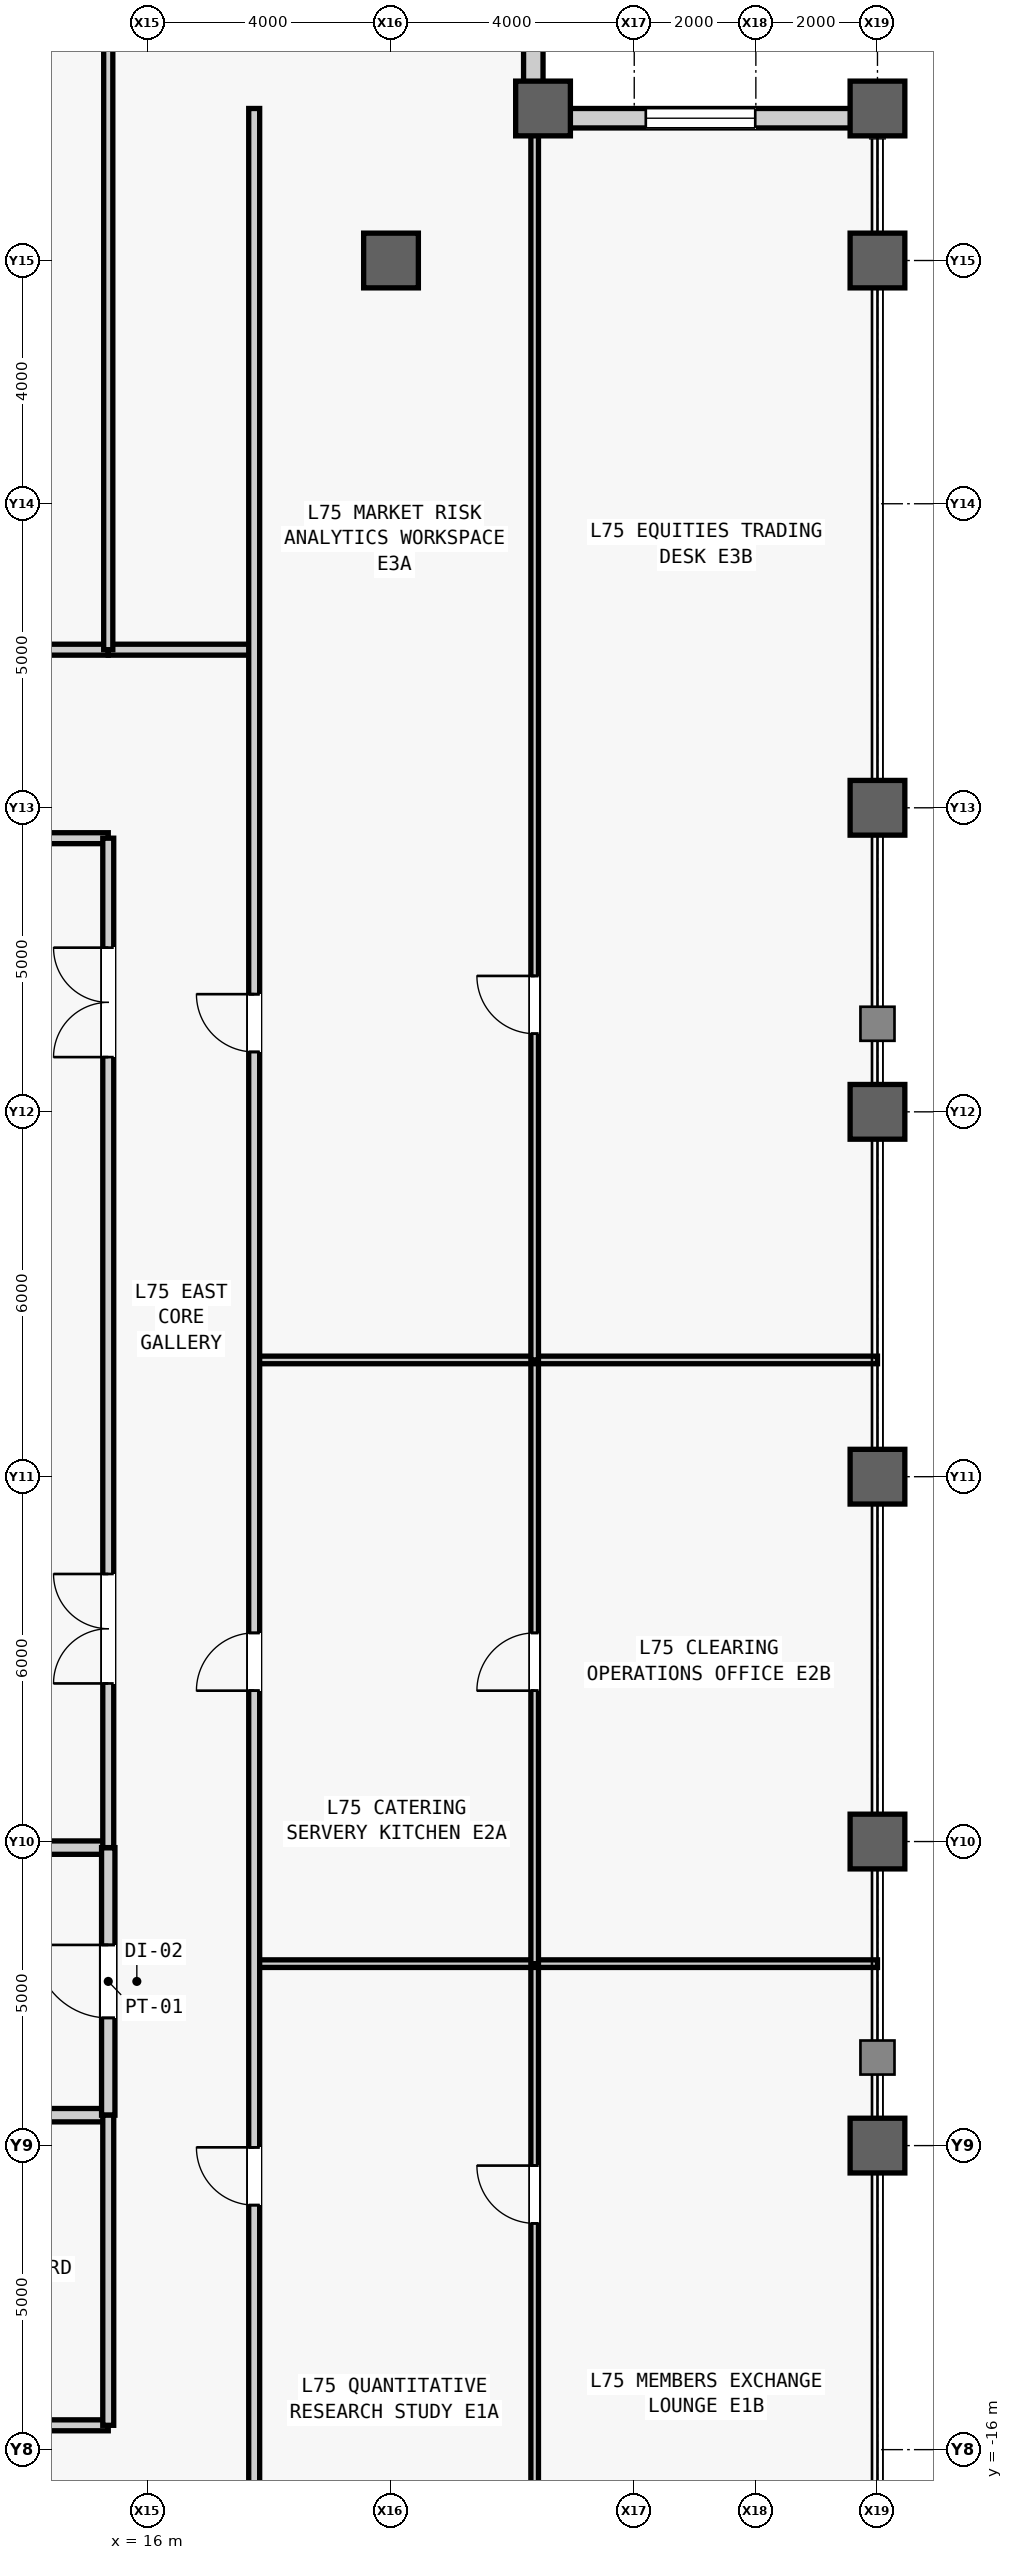
"""IFC4 building model, lengths in metres.
Left out: names, types, materials, properties, quantities, classifications, styles, units other than length and angle.
Written with IfcOpenShell. Run it as: python <this file> out.ifc"""

import sys

from ifc_helpers import new_model, si_unit, direction, frame, frame_2d, origin, origin_2d, place, context, subcontext, project, spatial, rectangle, hollow_rectangle, extrude, source, transform, mapped, element, fill, save


model = new_model("IFC4")
c1 = context("Model", 3, precision=1e-05, world=origin(), true_north=direction((0.0, 1.0)))
c2 = subcontext(c1, "Body", "Model", "MODEL_VIEW")
j1 = project(units=[si_unit("LENGTHUNIT", "METRE"), si_unit("PLANEANGLEUNIT", "RADIAN")], contexts=[c1])
p1 = place(None, origin())
s1 = spatial("IfcSite", under=j1, at=p1, CompositionType="ELEMENT")
p2 = place(p1, origin())
s2 = spatial("IfcBuilding", under=s1, at=p2, CompositionType="ELEMENT")
p3 = place(p2, frame((0.0, 0.0, 317.5)))
s3 = spatial("IfcBuildingStorey", under=s2, at=p3, CompositionType="ELEMENT", Elevation=317.5)
m1 = source(origin(), c2, "Body", "SweptSolid", [
    extrude(hollow_rectangle(XDim=0.9, YDim=0.9, WallThickness=0.05, at=origin_2d()), origin(), (0.0, 0.0, 1.0), 4.0),
])
for number, where, z_axis, x_axis in (
    (1, (20.0, 20.0, 0.0), (0.0, 0.0, 1.0), (1.0, 0.0, 0.0)),
    (2, (22.5, 22.5, 0.0), (0.0, 0.0, 1.0), (1.0, 0.0, 0.0)),
    (3, (28.0, -11.0, 0.0), (0.0, 0.0, 1.0), (1.0, 0.0, 0.0)),
    (4, (28.0, -6.0, 0.0), (0.0, 0.0, 1.0), (1.0, 0.0, 0.0)),
    (5, (28.0, 0.0, 0.0), (0.0, 0.0, 1.0), (1.0, 0.0, 0.0)),
    (6, (28.0, 6.0, 0.0), (0.0, 0.0, 1.0), (1.0, 0.0, 0.0)),
    (7, (28.0, 11.0, 0.0), (0.0, 0.0, 1.0), (1.0, 0.0, 0.0)),
    (8, (28.0, 20.0, 0.0), (0.0, 0.0, 1.0), (1.0, 0.0, 0.0)),
    (9, (28.0, 22.5, 0.0), (0.0, 0.0, 1.0), (1.0, 0.0, 0.0)),
):
    element("IfcColumn", number, at=place(p3, frame(where, z_axis=z_axis, x_axis=x_axis)), inside=s3, PredefinedType="COLUMN", context=c2, shape_type="MappedRepresentation", body=[
        mapped(m1, transform((0.0, 0.0, 0.0), scale=1.0)),
    ])
m2 = source(origin(), c2, "Body", "SweptSolid", [
    extrude(rectangle(XDim=5.18, YDim=0.32, at=frame_2d((2.59, 0.0))), origin(), (0.0, 0.0, 1.0), 3.231),
])
p4 = place(p3, frame((22.5, 22.34, 0.0), z_axis=(0.0, 0.0, 1.0), x_axis=(1.0, 0.0, 0.0)))
e10 = element("IfcWall", 10, at=p4, inside=s3, PredefinedType="STANDARD", context=c2, shape_type="MappedRepresentation", body=[
    mapped(m2, transform((0.0, 0.0, 0.0), scale=1.0)),
])
m3 = source(origin(), c2, "Body", "SweptSolid", [
    extrude(rectangle(XDim=1.8, YDim=2.4, at=frame_2d((0.9, 1.2))), frame((0.0, 0.17, 0.0), z_axis=(0.0, -1.0, 0.0), x_axis=(1.0, 0.0, 0.0)), (0.0, 0.0, 1.0), 0.34),
])
p5 = place(p4, frame((1.69, 0.0, 0.5)))
e11 = element("IfcOpeningElement", 11, at=p5, cuts=e10, PredefinedType="OPENING", context=c2, shape_type="MappedRepresentation", body=[
    mapped(m3, transform((0.0, 0.0, 0.0), scale=1.0)),
])
p6 = place(p3, frame((22.34, 22.5, 0.0), z_axis=(0.0, 0.0, 1.0), x_axis=(0.0, 1.0, 0.0)))
e12 = element("IfcWall", 12, at=p6, inside=s3, PredefinedType="STANDARD", context=c2, shape_type="MappedRepresentation", body=[
    mapped(m2, transform((0.0, 0.0, 0.0), scale=1.0)),
])
p7 = place(p6, frame((1.69, 0.0, 0.5)))
e13 = element("IfcOpeningElement", 13, at=p7, cuts=e12, PredefinedType="OPENING", context=c2, shape_type="MappedRepresentation", body=[
    mapped(m3, transform((0.0, 0.0, 0.0), scale=1.0)),
])
m4 = source(origin(), c2, "Body", "SweptSolid", [
    extrude(rectangle(XDim=4.05, YDim=0.22, at=frame_2d((2.025, 0.0))), origin(), (0.0, 0.0, 1.0), 3.78),
])
p8 = place(p3, frame((11.3, -10.5, 0.0), z_axis=(0.0, 0.0, 1.0), x_axis=(1.0, 0.0, 0.0)))
e14 = element("IfcWall", 14, at=p8, inside=s3, PredefinedType="PARTITIONING", context=c2, shape_type="MappedRepresentation", body=[
    mapped(m4, transform((0.0, 0.0, 0.0), scale=1.0)),
])
m5 = source(origin(), c2, "Body", "SweptSolid", [
    extrude(rectangle(XDim=4.05, YDim=0.22, at=frame_2d((2.025, 0.0))), origin(), (0.0, 0.0, 1.0), 3.085),
])
p9 = place(p3, frame((11.3, -6.1, 0.0), z_axis=(0.0, 0.0, 1.0), x_axis=(1.0, 0.0, 0.0)))
e15 = element("IfcWall", 15, at=p9, inside=s3, PredefinedType="PARTITIONING", context=c2, shape_type="MappedRepresentation", body=[
    mapped(m5, transform((0.0, 0.0, 0.0), scale=1.0)),
])
m6 = source(origin(), c2, "Body", "SweptSolid", [
    extrude(rectangle(XDim=4.4, YDim=0.22, at=frame_2d((2.2, 0.0))), origin(), (0.0, 0.0, 1.0), 3.78),
])
p10 = place(p3, frame((15.35, -10.5, 0.0), z_axis=(0.0, 0.0, 1.0), x_axis=(0.0, 1.0, 0.0)))
e16 = element("IfcWall", 16, at=p10, inside=s3, PredefinedType="PARTITIONING", context=c2, shape_type="MappedRepresentation", body=[
    mapped(m6, transform((0.0, 0.0, 0.0), scale=1.0)),
])
m7 = source(origin(), c2, "Body", "SweptSolid", [
    extrude(rectangle(XDim=1.2, YDim=2.2, at=frame_2d((0.6, 1.1))), frame((0.0, 0.12, 0.0), z_axis=(0.0, -1.0, 0.0), x_axis=(1.0, 0.0, 0.0)), (0.0, 0.0, 1.0), 0.24),
])
p11 = place(p10, frame((1.6, 0.0, 0.0)))
e17 = element("IfcOpeningElement", 17, at=p11, cuts=e16, PredefinedType="OPENING", context=c2, shape_type="MappedRepresentation", body=[
    mapped(m7, transform((0.0, 0.0, 0.0), scale=1.0)),
])
m8 = source(origin(), c2, "Body", "SweptSolid", [
    extrude(rectangle(XDim=4.05, YDim=0.18, at=frame_2d((2.025, 0.0))), origin(), (0.0, 0.0, 1.0), 3.78),
])
p12 = place(p3, frame((11.3, 10.5, 0.0), z_axis=(0.0, 0.0, 1.0), x_axis=(1.0, 0.0, 0.0)))
e18 = element("IfcWall", 18, at=p12, inside=s3, PredefinedType="PARTITIONING", context=c2, shape_type="MappedRepresentation", body=[
    mapped(m8, transform((0.0, 0.0, 0.0), scale=1.0)),
])
m9 = source(origin(), c2, "Body", "SweptSolid", [
    extrude(rectangle(XDim=16.6, YDim=0.18, at=frame_2d((8.3, 0.0))), origin(), (0.0, 0.0, 1.0), 3.78),
])
p13 = place(p3, frame((15.35, -6.1, 0.0), z_axis=(0.0, 0.0, 1.0), x_axis=(0.0, 1.0, 0.0)))
e19 = element("IfcWall", 19, at=p13, inside=s3, PredefinedType="PARTITIONING", context=c2, shape_type="MappedRepresentation", body=[
    mapped(m9, transform((0.0, 0.0, 0.0), scale=1.0)),
])
m10 = source(origin(), c2, "Body", "SweptSolid", [
    extrude(rectangle(XDim=1.8, YDim=2.25, at=frame_2d((0.9, 1.125))), frame((0.0, 0.1, 0.0), z_axis=(0.0, -1.0, 0.0), x_axis=(1.0, 0.0, 0.0)), (0.0, 0.0, 1.0), 0.2),
])
p14 = place(p13, frame((2.7, 0.0, 0.0)))
e20 = element("IfcOpeningElement", 20, at=p14, cuts=e19, PredefinedType="OPENING", context=c2, shape_type="MappedRepresentation", body=[
    mapped(m10, transform((0.0, 0.0, 0.0), scale=1.0)),
])
p15 = place(p13, frame((13.0, 0.0, 0.0)))
e21 = element("IfcOpeningElement", 21, at=p15, cuts=e19, PredefinedType="OPENING", context=c2, shape_type="MappedRepresentation", body=[
    mapped(m10, transform((0.0, 0.0, 0.0), scale=1.0)),
])
m11 = source(origin(), c2, "Body", "SweptSolid", [
    extrude(rectangle(XDim=14.05, YDim=0.18, at=frame_2d((7.025, 0.0))), origin(), (0.0, 0.0, 1.0), 3.78),
])
p16 = place(p3, frame((1.3, -15.6, 0.0), z_axis=(0.0, 0.0, 1.0), x_axis=(1.0, 0.0, 0.0)))
e22 = element("IfcWall", 22, at=p16, inside=s3, PredefinedType="PARTITIONING", context=c2, shape_type="MappedRepresentation", body=[
    mapped(m11, transform((0.0, 0.0, 0.0), scale=1.0)),
])
m12 = source(origin(), c2, "Body", "SweptSolid", [
    extrude(rectangle(XDim=0.9, YDim=2.15, at=frame_2d((0.45, 1.075))), frame((0.0, 0.1, 0.0), z_axis=(0.0, -1.0, 0.0), x_axis=(1.0, 0.0, 0.0)), (0.0, 0.0, 1.0), 0.2),
])
p17 = place(p16, frame((6.25, 0.0, 0.0)))
e23 = element("IfcOpeningElement", 23, at=p17, cuts=e22, PredefinedType="OPENING", context=c2, shape_type="MappedRepresentation", body=[
    mapped(m12, transform((0.0, 0.0, 0.0), scale=1.0)),
])
m13 = source(origin(), c2, "Body", "SweptSolid", [
    extrude(rectangle(XDim=5.1, YDim=0.18, at=frame_2d((2.55, 0.0))), origin(), (0.0, 0.0, 1.0), 3.78),
])
p18 = place(p3, frame((15.35, -15.6, 0.0), z_axis=(0.0, 0.0, 1.0), x_axis=(0.0, 1.0, 0.0)))
e24 = element("IfcWall", 24, at=p18, inside=s3, PredefinedType="PARTITIONING", context=c2, shape_type="MappedRepresentation", body=[
    mapped(m13, transform((0.0, 0.0, 0.0), scale=1.0)),
])
m14 = source(origin(), c2, "Body", "SweptSolid", [
    extrude(rectangle(XDim=2.4, YDim=0.18, at=frame_2d((1.2, 0.0))), origin(), (0.0, 0.0, 1.0), 3.78),
])
p19 = place(p3, frame((15.35, 13.6, 0.0), z_axis=(0.0, 0.0, 1.0), x_axis=(1.0, 0.0, 0.0)))
e25 = element("IfcWall", 25, at=p19, inside=s3, PredefinedType="PARTITIONING", context=c2, shape_type="MappedRepresentation", body=[
    mapped(m14, transform((0.0, 0.0, 0.0), scale=1.0)),
])
m15 = source(origin(), c2, "Body", "SweptSolid", [
    extrude(rectangle(XDim=32.75, YDim=0.18, at=frame_2d((16.375, 0.0))), origin(), (0.0, 0.0, 1.0), 3.78),
])
p20 = place(p3, frame((-17.4, 13.6, 0.0), z_axis=(0.0, 0.0, 1.0), x_axis=(1.0, 0.0, 0.0)))
e26 = element("IfcWall", 26, at=p20, inside=s3, PredefinedType="PARTITIONING", context=c2, shape_type="MappedRepresentation", body=[
    mapped(m15, transform((0.0, 0.0, 0.0), scale=1.0)),
])
m16 = source(origin(), c2, "Body", "SweptSolid", [
    extrude(rectangle(XDim=1.05, YDim=2.2, at=frame_2d((0.525, 1.1))), frame((0.0, 0.1, 0.0), z_axis=(0.0, -1.0, 0.0), x_axis=(1.0, 0.0, 0.0)), (0.0, 0.0, 1.0), 0.2),
])
p21 = place(p20, frame((27.075, 0.0, 0.0)))
e27 = element("IfcOpeningElement", 27, at=p21, cuts=e26, PredefinedType="OPENING", context=c2, shape_type="MappedRepresentation", body=[
    mapped(m16, transform((0.0, 0.0, 0.0), scale=1.0)),
])
m17 = source(origin(), c2, "Body", "SweptSolid", [
    extrude(rectangle(XDim=14.4, YDim=0.15, at=frame_2d((7.2, 0.0))), origin(), (0.0, 0.0, 1.0), 3.78),
])
p22 = place(p3, frame((15.35, 13.6, 0.0), z_axis=(0.0, 0.0, 1.0), x_axis=(0.0, 1.0, 0.0)))
e28 = element("IfcWall", 28, at=p22, inside=s3, PredefinedType="PARTITIONING", context=c2, shape_type="MappedRepresentation", body=[
    mapped(m17, transform((0.0, 0.0, 0.0), scale=1.0)),
])
m18 = source(origin(), c2, "Body", "SweptSolid", [
    extrude(rectangle(XDim=9.992, YDim=0.125, at=frame_2d((4.996, 0.0))), origin(), (0.0, 0.0, 1.0), 3.164),
])
p23 = place(p3, frame((22.363, -18.0, 0.0), z_axis=(0.0, 0.0, 1.0), x_axis=(0.0, 1.0, 0.0)))
e29 = element("IfcWall", 29, at=p23, inside=s3, PredefinedType="PARTITIONING", context=c2, shape_type="MappedRepresentation", body=[
    mapped(m18, transform((0.0, 0.0, 0.0), scale=1.0)),
])
m19 = source(origin(), c2, "Body", "SweptSolid", [
    extrude(rectangle(XDim=0.95, YDim=2.15, at=frame_2d((0.475, 1.075))), frame((0.0, 0.073, 0.0), z_axis=(0.0, -1.0, 0.0), x_axis=(1.0, 0.0, 0.0)), (0.0, 0.0, 1.0), 0.145),
])
p24 = place(p23, frame((5.721, 0.0, 0.0)))
e30 = element("IfcOpeningElement", 30, at=p24, cuts=e29, PredefinedType="OPENING", context=c2, shape_type="MappedRepresentation", body=[
    mapped(m19, transform((0.0, 0.0, 0.0), scale=1.0)),
])
m20 = source(origin(), c2, "Body", "SweptSolid", [
    extrude(rectangle(XDim=10.25, YDim=0.125, at=frame_2d((5.125, 0.0))), origin(), (0.0, 0.0, 1.0), 3.78),
])
p25 = place(p3, frame((17.75, -8.008, 0.0), z_axis=(0.0, 0.0, 1.0), x_axis=(1.0, 0.0, 0.0)))
e31 = element("IfcWall", 31, at=p25, inside=s3, PredefinedType="PARTITIONING", context=c2, shape_type="MappedRepresentation", body=[
    mapped(m20, transform((0.0, 0.0, 0.0), scale=1.0)),
])
m21 = source(origin(), c2, "Body", "SweptSolid", [
    extrude(rectangle(XDim=9.928, YDim=0.125, at=frame_2d((4.964, 0.0))), origin(), (0.0, 0.0, 1.0), 3.78),
])
p26 = place(p3, frame((22.363, -8.008, 0.0), z_axis=(0.0, 0.0, 1.0), x_axis=(0.0, 1.0, 0.0)))
e32 = element("IfcWall", 32, at=p26, inside=s3, PredefinedType="PARTITIONING", context=c2, shape_type="MappedRepresentation", body=[
    mapped(m21, transform((0.0, 0.0, 0.0), scale=1.0)),
])
p27 = place(p26, frame((4.489, 0.0, 0.0)))
e33 = element("IfcOpeningElement", 33, at=p27, cuts=e32, PredefinedType="OPENING", context=c2, shape_type="MappedRepresentation", body=[
    mapped(m19, transform((0.0, 0.0, 0.0), scale=1.0)),
])
p28 = place(p3, frame((17.75, 1.92, 0.0), z_axis=(0.0, 0.0, 1.0), x_axis=(1.0, 0.0, 0.0)))
e34 = element("IfcWall", 34, at=p28, inside=s3, PredefinedType="PARTITIONING", context=c2, shape_type="MappedRepresentation", body=[
    mapped(m20, transform((0.0, 0.0, 0.0), scale=1.0)),
])
m22 = source(origin(), c2, "Body", "SweptSolid", [
    extrude(rectangle(XDim=20.58, YDim=0.125, at=frame_2d((10.29, 0.0))), origin(), (0.0, 0.0, 1.0), 3.164),
])
p29 = place(p3, frame((22.363, 1.92, 0.0), z_axis=(0.0, 0.0, 1.0), x_axis=(0.0, 1.0, 0.0)))
e35 = element("IfcWall", 35, at=p29, inside=s3, PredefinedType="PARTITIONING", context=c2, shape_type="MappedRepresentation", body=[
    mapped(m22, transform((0.0, 0.0, 0.0), scale=1.0)),
])
p30 = place(p29, frame((5.365, 0.0, 0.0)))
e36 = element("IfcOpeningElement", 36, at=p30, cuts=e35, PredefinedType="OPENING", context=c2, shape_type="MappedRepresentation", body=[
    mapped(m19, transform((0.0, 0.0, 0.0), scale=1.0)),
])
m23 = source(origin(), c2, "Body", "SweptSolid", [
    extrude(rectangle(XDim=40.5, YDim=0.18, at=frame_2d((20.25, 0.0))), origin(), (0.0, 0.0, 1.0), 3.78),
])
p31 = place(p3, frame((17.75, -18.0, 0.0), z_axis=(0.0, 0.0, 1.0), x_axis=(0.0, 1.0, 0.0)))
e37 = element("IfcWall", 37, at=p31, inside=s3, PredefinedType="PARTITIONING", context=c2, shape_type="MappedRepresentation", body=[
    mapped(m23, transform((0.0, 0.0, 0.0), scale=1.0)),
])
m24 = source(origin(), c2, "Body", "SweptSolid", [
    extrude(rectangle(XDim=0.95, YDim=2.15, at=frame_2d((0.475, 1.075))), frame((0.0, 0.1, 0.0), z_axis=(0.0, -1.0, 0.0), x_axis=(1.0, 0.0, 0.0)), (0.0, 0.0, 1.0), 0.2),
])
p32 = place(p31, frame((6.021, 0.0, 0.0)))
e38 = element("IfcOpeningElement", 38, at=p32, cuts=e37, PredefinedType="OPENING", context=c2, shape_type="MappedRepresentation", body=[
    mapped(m24, transform((0.0, 0.0, 0.0), scale=1.0)),
])
p33 = place(p31, frame((14.481, 0.0, 0.0)))
e39 = element("IfcOpeningElement", 39, at=p33, cuts=e37, PredefinedType="OPENING", context=c2, shape_type="MappedRepresentation", body=[
    mapped(m24, transform((0.0, 0.0, 0.0), scale=1.0)),
])
p34 = place(p31, frame((24.985, 0.0, 0.0)))
e40 = element("IfcOpeningElement", 40, at=p34, cuts=e37, PredefinedType="OPENING", context=c2, shape_type="MappedRepresentation", body=[
    mapped(m24, transform((0.0, 0.0, 0.0), scale=1.0)),
])
m25 = source(origin(), c2, "Body", "SweptSolid", [
    extrude(rectangle(XDim=1.8, YDim=2.4, at=frame_2d((0.9, 1.2))), frame((0.0, 0.03, 0.0), z_axis=(0.0, -1.0, 0.0), x_axis=(1.0, 0.0, 0.0)), (0.0, 0.0, 1.0), 0.06),
])
p35 = place(p5, origin())
e41 = element("IfcWindow", 41, at=p35, inside=s3, PartitioningType="SINGLE_PANEL", PredefinedType="WINDOW", context=c2, shape_type="MappedRepresentation", body=[
    mapped(m25, transform((0.0, 0.0, 0.0), scale=1.0)),
])
fill(e11, e41)
m26 = source(origin(), c2, "Body", "SweptSolid", [
    extrude(rectangle(XDim=1.2, YDim=2.2, at=frame_2d((0.6, 1.1))), frame((0.0, 0.025, 0.0), z_axis=(0.0, -1.0, 0.0), x_axis=(1.0, 0.0, 0.0)), (0.0, 0.0, 1.0), 0.05),
])
p36 = place(p11, origin())
e42 = element("IfcDoor", 42, at=p36, inside=s3, OperationType="SINGLE_SWING_RIGHT", PredefinedType="DOOR", context=c2, shape_type="MappedRepresentation", body=[
    mapped(m26, transform((0.0, 0.0, 0.0), scale=1.0)),
])
fill(e17, e42)
m27 = source(origin(), c2, "Body", "SweptSolid", [
    extrude(rectangle(XDim=1.8, YDim=2.25, at=frame_2d((0.9, 1.125))), frame((0.0, 0.025, 0.0), z_axis=(0.0, -1.0, 0.0), x_axis=(1.0, 0.0, 0.0)), (0.0, 0.0, 1.0), 0.05),
])
p37 = place(p14, origin())
e43 = element("IfcDoor", 43, at=p37, inside=s3, OperationType="SINGLE_SWING_RIGHT", PredefinedType="DOOR", context=c2, shape_type="MappedRepresentation", body=[
    mapped(m27, transform((0.0, 0.0, 0.0), scale=1.0)),
])
fill(e20, e43)
p38 = place(p15, origin())
e44 = element("IfcDoor", 44, at=p38, inside=s3, OperationType="SINGLE_SWING_LEFT", PredefinedType="DOOR", context=c2, shape_type="MappedRepresentation", body=[
    mapped(m27, transform((0.0, 0.0, 0.0), scale=1.0)),
])
fill(e21, e44)
m28 = source(origin(), c2, "Body", "SweptSolid", [
    extrude(rectangle(XDim=0.95, YDim=2.15, at=frame_2d((0.475, 1.075))), frame((0.0, 0.025, 0.0), z_axis=(0.0, -1.0, 0.0), x_axis=(1.0, 0.0, 0.0)), (0.0, 0.0, 1.0), 0.05),
])
p39 = place(p24, origin())
e45 = element("IfcDoor", 45, at=p39, inside=s3, OperationType="SINGLE_SWING_RIGHT", PredefinedType="DOOR", context=c2, shape_type="MappedRepresentation", body=[
    mapped(m28, transform((0.0, 0.0, 0.0), scale=1.0)),
])
fill(e30, e45)
p40 = place(p27, origin())
e46 = element("IfcDoor", 46, at=p40, inside=s3, OperationType="SINGLE_SWING_LEFT", PredefinedType="DOOR", context=c2, shape_type="MappedRepresentation", body=[
    mapped(m28, transform((0.0, 0.0, 0.0), scale=1.0)),
])
fill(e33, e46)
p41 = place(p30, origin())
e47 = element("IfcDoor", 47, at=p41, inside=s3, OperationType="SINGLE_SWING_RIGHT", PredefinedType="DOOR", context=c2, shape_type="MappedRepresentation", body=[
    mapped(m28, transform((0.0, 0.0, 0.0), scale=1.0)),
])
fill(e36, e47)
p42 = place(p32, origin())
e48 = element("IfcDoor", 48, at=p42, inside=s3, OperationType="SINGLE_SWING_RIGHT", PredefinedType="DOOR", context=c2, shape_type="MappedRepresentation", body=[
    mapped(m28, transform((0.0, 0.0, 0.0), scale=1.0)),
])
fill(e38, e48)
p43 = place(p33, origin())
e49 = element("IfcDoor", 49, at=p43, inside=s3, OperationType="SINGLE_SWING_LEFT", PredefinedType="DOOR", context=c2, shape_type="MappedRepresentation", body=[
    mapped(m28, transform((0.0, 0.0, 0.0), scale=1.0)),
])
fill(e39, e49)
p44 = place(p34, origin())
e50 = element("IfcDoor", 50, at=p44, inside=s3, OperationType="SINGLE_SWING_RIGHT", PredefinedType="DOOR", context=c2, shape_type="MappedRepresentation", body=[
    mapped(m28, transform((0.0, 0.0, 0.0), scale=1.0)),
])
fill(e40, e50)
save(model, sys.argv[1])
